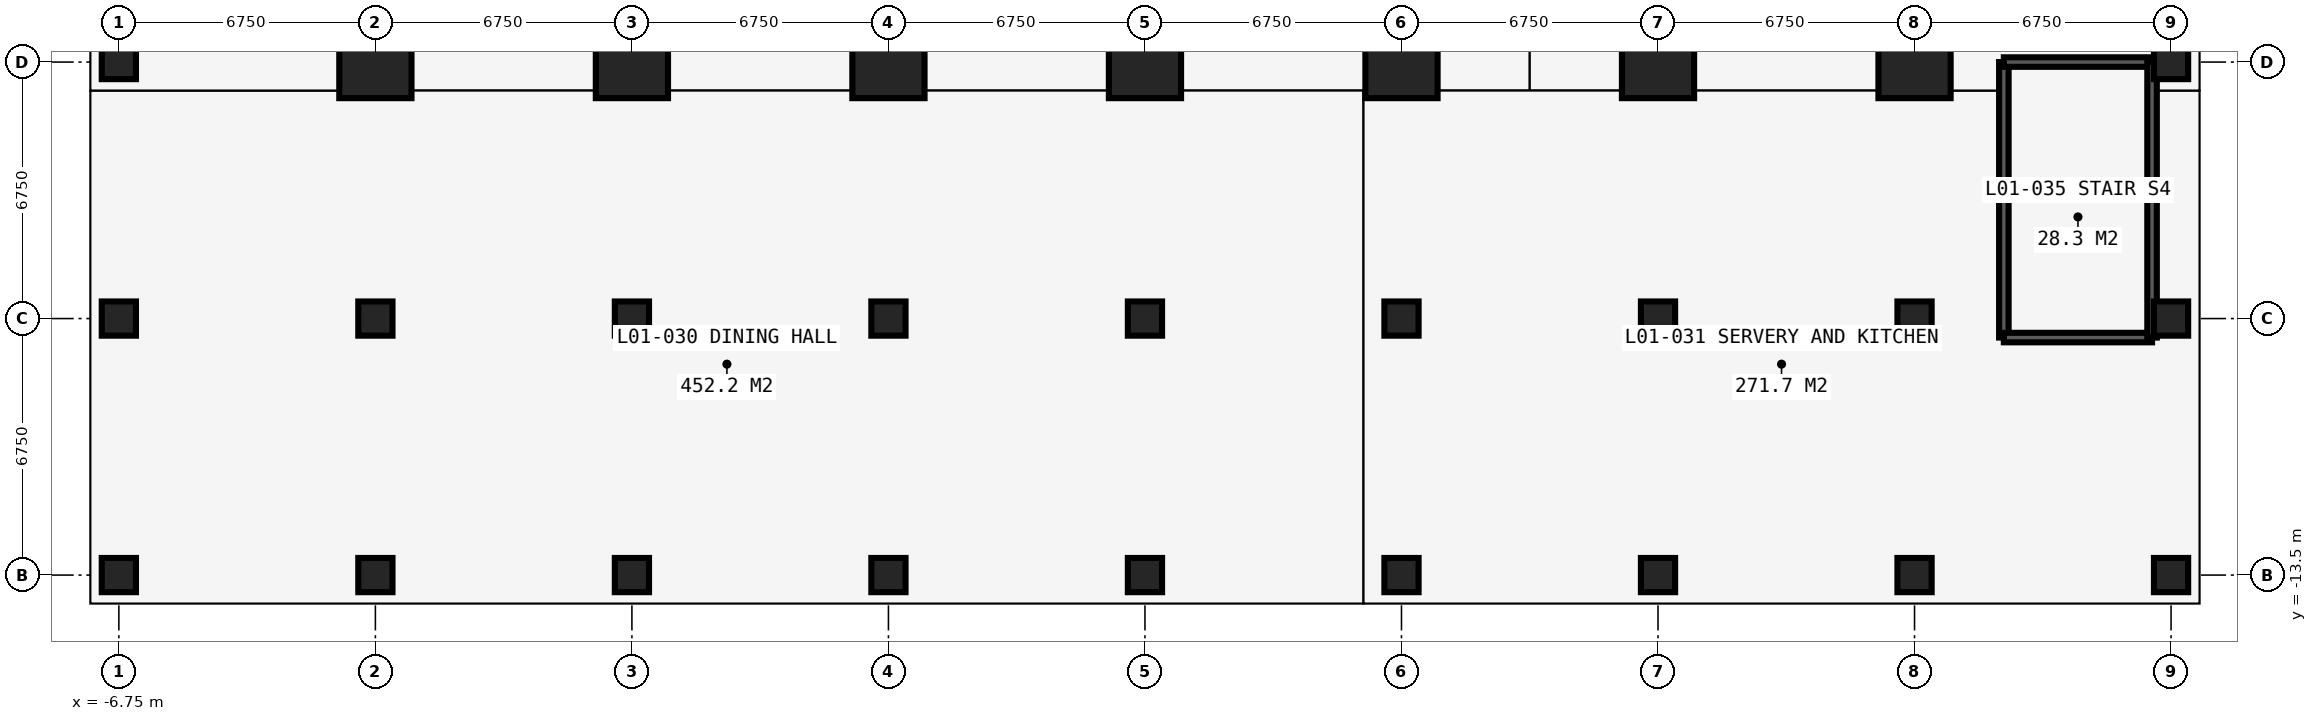
"""IFC4 building model, lengths in metres.
Left out: names, types, materials, properties, quantities, classifications, styles, units other than length and angle.
Written with IfcOpenShell. Run it as: python <this file> out.ifc"""

import sys

from ifc_helpers import new_model, si_unit, direction, frame, frame_2d, origin, origin_with_axes, origin_2d, place, context, subcontext, project, spatial, rectangle, circle, extrude, element, fill, save


model = new_model("IFC4")
c1 = context("Model", 3, precision=1e-05, world=origin(), true_north=direction((0.0, 1.0)))
c2 = subcontext(c1, "Body", "Model", "MODEL_VIEW")
j1 = project(units=[si_unit("LENGTHUNIT", "METRE"), si_unit("PLANEANGLEUNIT", "RADIAN")], contexts=[c1])
p1 = place(None, origin())
s1 = spatial("IfcSite", under=j1, at=p1, CompositionType="ELEMENT")
p2 = place(p1, origin())
s2 = spatial("IfcBuilding", under=s1, at=p2, CompositionType="ELEMENT")
p3 = place(p2, frame((0.0, 0.0, 4.5)))
s3 = spatial("IfcBuildingStorey", under=s2, at=p3, CompositionType="ELEMENT", Elevation=4.5)
for number, where, z_axis, x_axis in (
    (1, (-6.75, -13.5, 0.0), (0.0, 0.0, 1.0), (1.0, 0.0, 0.0)),
    (2, (-6.75, -6.75, 0.0), (0.0, 0.0, 1.0), (1.0, 0.0, 0.0)),
    (3, (-6.75, 0.0, 0.0), (0.0, 0.0, 1.0), (1.0, 0.0, 0.0)),
    (4, (0.0, -13.5, 0.0), (0.0, 0.0, 1.0), (1.0, 0.0, 0.0)),
    (5, (0.0, -6.75, 0.0), (0.0, 0.0, 1.0), (1.0, 0.0, 0.0)),
):
    element("IfcColumn", number, at=place(p3, frame(where, z_axis=z_axis, x_axis=x_axis)), inside=s3, PredefinedType="COLUMN", context=c2, shape_type="SweptSolid", body=[
        extrude(circle(Radius=0.45, at=origin_2d()), origin(), (0.0, 0.0, 1.0), 4.5),
    ])
p4 = place(p3, origin_with_axes())
e6 = element("IfcColumn", 6, at=p4, inside=s3, PredefinedType="COLUMN", context=c2, shape_type="SweptSolid", body=[
    extrude(rectangle(XDim=1.9, YDim=1.9, at=origin_2d()), origin(), (0.0, 0.0, 1.0), 4.5),
])
for number, where, z_axis, x_axis in (
    (7, (6.75, -13.5, 0.0), (0.0, 0.0, 1.0), (1.0, 0.0, 0.0)),
    (8, (6.75, -6.75, 0.0), (0.0, 0.0, 1.0), (1.0, 0.0, 0.0)),
):
    element("IfcColumn", number, at=place(p3, frame(where, z_axis=z_axis, x_axis=x_axis)), inside=s3, PredefinedType="COLUMN", context=c2, shape_type="SweptSolid", body=[
        extrude(circle(Radius=0.45, at=origin_2d()), origin(), (0.0, 0.0, 1.0), 4.5),
    ])
p5 = place(p3, frame((6.75, 0.0, 0.0), z_axis=(0.0, 0.0, 1.0), x_axis=(1.0, 0.0, 0.0)))
e9 = element("IfcColumn", 9, at=p5, inside=s3, PredefinedType="COLUMN", context=c2, shape_type="SweptSolid", body=[
    extrude(rectangle(XDim=1.9, YDim=1.9, at=origin_2d()), origin(), (0.0, 0.0, 1.0), 4.5),
])
for number, where, z_axis, x_axis in (
    (10, (13.5, -13.5, 0.0), (0.0, 0.0, 1.0), (1.0, 0.0, 0.0)),
    (11, (13.5, -6.75, 0.0), (0.0, 0.0, 1.0), (1.0, 0.0, 0.0)),
):
    element("IfcColumn", number, at=place(p3, frame(where, z_axis=z_axis, x_axis=x_axis)), inside=s3, PredefinedType="COLUMN", context=c2, shape_type="SweptSolid", body=[
        extrude(circle(Radius=0.45, at=origin_2d()), origin(), (0.0, 0.0, 1.0), 4.5),
    ])
p6 = place(p3, frame((13.5, 0.0, 0.0), z_axis=(0.0, 0.0, 1.0), x_axis=(1.0, 0.0, 0.0)))
e12 = element("IfcColumn", 12, at=p6, inside=s3, PredefinedType="COLUMN", context=c2, shape_type="SweptSolid", body=[
    extrude(rectangle(XDim=1.9, YDim=1.9, at=origin_2d()), origin(), (0.0, 0.0, 1.0), 4.5),
])
for number, where, z_axis, x_axis in (
    (13, (20.25, -13.5, 0.0), (0.0, 0.0, 1.0), (1.0, 0.0, 0.0)),
    (14, (20.25, -6.75, 0.0), (0.0, 0.0, 1.0), (1.0, 0.0, 0.0)),
):
    element("IfcColumn", number, at=place(p3, frame(where, z_axis=z_axis, x_axis=x_axis)), inside=s3, PredefinedType="COLUMN", context=c2, shape_type="SweptSolid", body=[
        extrude(circle(Radius=0.45, at=origin_2d()), origin(), (0.0, 0.0, 1.0), 4.5),
    ])
p7 = place(p3, frame((20.25, 0.0, 0.0), z_axis=(0.0, 0.0, 1.0), x_axis=(1.0, 0.0, 0.0)))
e15 = element("IfcColumn", 15, at=p7, inside=s3, PredefinedType="COLUMN", context=c2, shape_type="SweptSolid", body=[
    extrude(rectangle(XDim=1.9, YDim=1.9, at=origin_2d()), origin(), (0.0, 0.0, 1.0), 4.5),
])
for number, where, z_axis, x_axis in (
    (16, (27.0, -13.5, 0.0), (0.0, 0.0, 1.0), (1.0, 0.0, 0.0)),
    (17, (27.0, -6.75, 0.0), (0.0, 0.0, 1.0), (1.0, 0.0, 0.0)),
):
    element("IfcColumn", number, at=place(p3, frame(where, z_axis=z_axis, x_axis=x_axis)), inside=s3, PredefinedType="COLUMN", context=c2, shape_type="SweptSolid", body=[
        extrude(circle(Radius=0.45, at=origin_2d()), origin(), (0.0, 0.0, 1.0), 4.5),
    ])
p8 = place(p3, frame((27.0, 0.0, 0.0), z_axis=(0.0, 0.0, 1.0), x_axis=(1.0, 0.0, 0.0)))
e18 = element("IfcColumn", 18, at=p8, inside=s3, PredefinedType="COLUMN", context=c2, shape_type="SweptSolid", body=[
    extrude(rectangle(XDim=1.9, YDim=1.9, at=origin_2d()), origin(), (0.0, 0.0, 1.0), 4.5),
])
for number, where, z_axis, x_axis in (
    (19, (33.75, -13.5, 0.0), (0.0, 0.0, 1.0), (1.0, 0.0, 0.0)),
    (20, (33.75, -6.75, 0.0), (0.0, 0.0, 1.0), (1.0, 0.0, 0.0)),
):
    element("IfcColumn", number, at=place(p3, frame(where, z_axis=z_axis, x_axis=x_axis)), inside=s3, PredefinedType="COLUMN", context=c2, shape_type="SweptSolid", body=[
        extrude(circle(Radius=0.45, at=origin_2d()), origin(), (0.0, 0.0, 1.0), 4.5),
    ])
p9 = place(p3, frame((33.75, 0.0, 0.0), z_axis=(0.0, 0.0, 1.0), x_axis=(1.0, 0.0, 0.0)))
e21 = element("IfcColumn", 21, at=p9, inside=s3, PredefinedType="COLUMN", context=c2, shape_type="SweptSolid", body=[
    extrude(rectangle(XDim=1.9, YDim=1.9, at=origin_2d()), origin(), (0.0, 0.0, 1.0), 4.5),
])
for number, where, z_axis, x_axis in (
    (22, (40.5, -13.5, 0.0), (0.0, 0.0, 1.0), (1.0, 0.0, 0.0)),
    (23, (40.5, -6.75, 0.0), (0.0, 0.0, 1.0), (1.0, 0.0, 0.0)),
):
    element("IfcColumn", number, at=place(p3, frame(where, z_axis=z_axis, x_axis=x_axis)), inside=s3, PredefinedType="COLUMN", context=c2, shape_type="SweptSolid", body=[
        extrude(circle(Radius=0.45, at=origin_2d()), origin(), (0.0, 0.0, 1.0), 4.5),
    ])
p10 = place(p3, frame((40.5, 0.0, 0.0), z_axis=(0.0, 0.0, 1.0), x_axis=(1.0, 0.0, 0.0)))
e24 = element("IfcColumn", 24, at=p10, inside=s3, PredefinedType="COLUMN", context=c2, shape_type="SweptSolid", body=[
    extrude(rectangle(XDim=1.9, YDim=1.9, at=origin_2d()), origin(), (0.0, 0.0, 1.0), 4.5),
])
for number, where, z_axis, x_axis in (
    (25, (47.25, -13.5, 0.0), (0.0, 0.0, 1.0), (1.0, 0.0, 0.0)),
    (26, (47.25, -6.75, 0.0), (0.0, 0.0, 1.0), (1.0, 0.0, 0.0)),
    (27, (47.25, 0.0, 0.0), (0.0, 0.0, 1.0), (1.0, 0.0, 0.0)),
):
    element("IfcColumn", number, at=place(p3, frame(where, z_axis=z_axis, x_axis=x_axis)), inside=s3, PredefinedType="COLUMN", context=c2, shape_type="SweptSolid", body=[
        extrude(circle(Radius=0.45, at=origin_2d()), origin(), (0.0, 0.0, 1.0), 4.5),
    ])
p11 = place(p3, frame((13.5, -14.25, 0.0), z_axis=(0.0, 0.0, 1.0), x_axis=(-1.0, 0.0, 0.0)))
e28 = element("IfcWall", 28, at=p11, inside=s3, PredefinedType="SOLIDWALL", context=c2, shape_type="SweptSolid", body=[
    extrude(rectangle(XDim=6.75, YDim=0.15, at=frame_2d((3.375, 0.0))), origin(), (0.0, 0.0, 1.0), 4.25),
])
p12 = place(p11, frame((0.488, 0.0, 0.0)))
e29 = element("IfcOpeningElement", 29, at=p12, cuts=e28, PredefinedType="OPENING", context=c2, shape_type="SweptSolid", body=[
    extrude(rectangle(XDim=2.4, YDim=2.4, at=frame_2d((1.2, 1.2))), frame((0.0, 0.085, 0.0), z_axis=(0.0, -1.0, 0.0), x_axis=(1.0, 0.0, 0.0)), (0.0, 0.0, 1.0), 0.17),
])
p13 = place(p11, frame((3.863, 0.0, 0.0)))
e30 = element("IfcOpeningElement", 30, at=p13, cuts=e28, PredefinedType="OPENING", context=c2, shape_type="SweptSolid", body=[
    extrude(rectangle(XDim=2.4, YDim=2.4, at=frame_2d((1.2, 1.2))), frame((0.0, 0.085, 0.0), z_axis=(0.0, -1.0, 0.0), x_axis=(1.0, 0.0, 0.0)), (0.0, 0.0, 1.0), 0.17),
])
p14 = place(p3, frame((27.0, -14.25, 0.0), z_axis=(0.0, 0.0, 1.0), x_axis=(-1.0, 0.0, 0.0)))
e31 = element("IfcWall", 31, at=p14, inside=s3, PredefinedType="SOLIDWALL", context=c2, shape_type="SweptSolid", body=[
    extrude(rectangle(XDim=6.75, YDim=0.15, at=frame_2d((3.375, 0.0))), origin(), (0.0, 0.0, 1.0), 4.25),
])
p15 = place(p14, frame((0.488, 0.0, 0.0)))
e32 = element("IfcOpeningElement", 32, at=p15, cuts=e31, PredefinedType="OPENING", context=c2, shape_type="SweptSolid", body=[
    extrude(rectangle(XDim=2.4, YDim=2.4, at=frame_2d((1.2, 1.2))), frame((0.0, 0.085, 0.0), z_axis=(0.0, -1.0, 0.0), x_axis=(1.0, 0.0, 0.0)), (0.0, 0.0, 1.0), 0.17),
])
p16 = place(p14, frame((3.863, 0.0, 0.0)))
e33 = element("IfcOpeningElement", 33, at=p16, cuts=e31, PredefinedType="OPENING", context=c2, shape_type="SweptSolid", body=[
    extrude(rectangle(XDim=2.4, YDim=2.4, at=frame_2d((1.2, 1.2))), frame((0.0, 0.085, 0.0), z_axis=(0.0, -1.0, 0.0), x_axis=(1.0, 0.0, 0.0)), (0.0, 0.0, 1.0), 0.17),
])
p17 = place(p3, frame((40.5, -14.25, 0.0), z_axis=(0.0, 0.0, 1.0), x_axis=(-1.0, 0.0, 0.0)))
e34 = element("IfcWall", 34, at=p17, inside=s3, PredefinedType="SOLIDWALL", context=c2, shape_type="SweptSolid", body=[
    extrude(rectangle(XDim=6.75, YDim=0.15, at=frame_2d((3.375, 0.0))), origin(), (0.0, 0.0, 1.0), 4.25),
])
p18 = place(p17, frame((0.488, 0.0, 0.0)))
e35 = element("IfcOpeningElement", 35, at=p18, cuts=e34, PredefinedType="OPENING", context=c2, shape_type="SweptSolid", body=[
    extrude(rectangle(XDim=2.4, YDim=2.4, at=frame_2d((1.2, 1.2))), frame((0.0, 0.085, 0.0), z_axis=(0.0, -1.0, 0.0), x_axis=(1.0, 0.0, 0.0)), (0.0, 0.0, 1.0), 0.17),
])
p19 = place(p17, frame((3.863, 0.0, 0.0)))
e36 = element("IfcOpeningElement", 36, at=p19, cuts=e34, PredefinedType="OPENING", context=c2, shape_type="SweptSolid", body=[
    extrude(rectangle(XDim=2.4, YDim=2.4, at=frame_2d((1.2, 1.2))), frame((0.0, 0.085, 0.0), z_axis=(0.0, -1.0, 0.0), x_axis=(1.0, 0.0, 0.0)), (0.0, 0.0, 1.0), 0.17),
])
p20 = place(p3, frame((-7.484, -0.75, 0.0), z_axis=(0.0, 0.0, 1.0), x_axis=(1.0, 0.0, 0.0)))
e37 = element("IfcWall", 37, at=p20, inside=s3, PredefinedType="PARTITIONING", context=c2, shape_type="SweptSolid", body=[
    extrude(rectangle(XDim=50.334, YDim=0.15, at=frame_2d((25.167, 0.0))), origin(), (0.0, 0.0, 1.0), 4.25),
])
p21 = place(p20, frame((18.384, 0.0, 0.0)))
e38 = element("IfcOpeningElement", 38, at=p21, cuts=e37, PredefinedType="OPENING", context=c2, shape_type="SweptSolid", body=[
    extrude(rectangle(XDim=1.6, YDim=2.4, at=frame_2d((0.8, 1.2))), frame((0.0, 0.085, 0.0), z_axis=(0.0, -1.0, 0.0), x_axis=(1.0, 0.0, 0.0)), (0.0, 0.0, 1.0), 0.17),
])
p22 = place(p20, frame((35.484, 0.0, 0.0)))
e39 = element("IfcOpeningElement", 39, at=p22, cuts=e37, PredefinedType="OPENING", context=c2, shape_type="SweptSolid", body=[
    extrude(rectangle(XDim=1.6, YDim=2.4, at=frame_2d((0.8, 1.2))), frame((0.0, 0.085, 0.0), z_axis=(0.0, -1.0, 0.0), x_axis=(1.0, 0.0, 0.0)), (0.0, 0.0, 1.0), 0.17),
])
p23 = place(p3, frame((-0.75, -0.75, 0.0), z_axis=(0.0, 0.0, 1.0), x_axis=(0.0, 1.0, 0.0)))
e40 = element("IfcWall", 40, at=p23, inside=s3, PredefinedType="PARTITIONING", context=c2, shape_type="SweptSolid", body=[
    extrude(rectangle(XDim=41.984, YDim=0.15, at=frame_2d((20.992, 0.0))), origin(), (0.0, 0.0, 1.0), 4.25),
])
p24 = place(p23, frame((4.65, 0.0, 0.0)))
e41 = element("IfcOpeningElement", 41, at=p24, cuts=e40, PredefinedType="OPENING", context=c2, shape_type="SweptSolid", body=[
    extrude(rectangle(XDim=1.6, YDim=2.4, at=frame_2d((0.8, 1.2))), frame((0.0, 0.085, 0.0), z_axis=(0.0, -1.0, 0.0), x_axis=(1.0, 0.0, 0.0)), (0.0, 0.0, 1.0), 0.17),
])
p25 = place(p3, frame((26.0, -14.175, 0.0), z_axis=(0.0, 0.0, 1.0), x_axis=(0.0, 1.0, 0.0)))
e42 = element("IfcWall", 42, at=p25, inside=s3, PredefinedType="PARTITIONING", context=c2, shape_type="SweptSolid", body=[
    extrude(rectangle(XDim=13.425, YDim=0.15, at=frame_2d((6.712, 0.0))), origin(), (0.0, 0.0, 1.0), 4.25),
])
p26 = place(p3, frame((30.375, -0.75, 0.0), z_axis=(0.0, 0.0, 1.0), x_axis=(0.0, 1.0, 0.0)))
e43 = element("IfcWall", 43, at=p26, inside=s3, PredefinedType="PARTITIONING", context=c2, shape_type="SweptSolid", body=[
    extrude(rectangle(XDim=12.05, YDim=0.15, at=frame_2d((6.025, 0.0))), origin(), (0.0, 0.0, 1.0), 4.25),
])
p27 = place(p3, frame((41.25, -0.75, 0.0), z_axis=(0.0, 0.0, 1.0), x_axis=(0.0, 1.0, 0.0)))
e44 = element("IfcWall", 44, at=p27, inside=s3, PredefinedType="PARTITIONING", context=c2, shape_type="SweptSolid", body=[
    extrude(rectangle(XDim=41.984, YDim=0.15, at=frame_2d((20.992, 0.0))), origin(), (0.0, 0.0, 1.0), 4.25),
])
p28 = place(p27, frame((15.2, 0.0, 0.0)))
e45 = element("IfcOpeningElement", 45, at=p28, cuts=e44, PredefinedType="OPENING", context=c2, shape_type="SweptSolid", body=[
    extrude(rectangle(XDim=1.6, YDim=2.4, at=frame_2d((0.8, 1.2))), frame((0.0, 0.085, 0.0), z_axis=(0.0, -1.0, 0.0), x_axis=(1.0, 0.0, 0.0)), (0.0, 0.0, 1.0), 0.17),
])
p29 = place(p3, frame((42.85, -7.25, 0.0), z_axis=(0.0, 0.0, 1.0), x_axis=(0.0, 1.0, 0.0)))
e46 = element("IfcWall", 46, at=p29, inside=s3, PredefinedType="SOLIDWALL", context=c2, shape_type="SweptSolid", body=[
    extrude(rectangle(XDim=7.25, YDim=0.25, at=frame_2d((3.625, 0.0))), origin(), (0.0, 0.0, 1.0), 4.25),
])
p30 = place(p3, frame((42.85, -7.25, 0.0), z_axis=(0.0, 0.0, 1.0), x_axis=(1.0, 0.0, 0.0)))
e47 = element("IfcWall", 47, at=p30, inside=s3, PredefinedType="SOLIDWALL", context=c2, shape_type="SweptSolid", body=[
    extrude(rectangle(XDim=3.9, YDim=0.25, at=frame_2d((1.95, 0.0))), origin(), (0.0, 0.0, 1.0), 4.25),
])
p31 = place(p30, frame((1.35, 0.0, 0.0)))
e48 = element("IfcOpeningElement", 48, at=p31, cuts=e47, PredefinedType="OPENING", context=c2, shape_type="SweptSolid", body=[
    extrude(rectangle(XDim=1.2, YDim=2.2, at=frame_2d((0.6, 1.1))), frame((0.0, 0.135, 0.0), z_axis=(0.0, -1.0, 0.0), x_axis=(1.0, 0.0, 0.0)), (0.0, 0.0, 1.0), 0.27),
])
p32 = place(p3, frame((42.85, 0.0, 0.0), z_axis=(0.0, 0.0, 1.0), x_axis=(1.0, 0.0, 0.0)))
e49 = element("IfcWall", 49, at=p32, inside=s3, PredefinedType="SOLIDWALL", context=c2, shape_type="SweptSolid", body=[
    extrude(rectangle(XDim=3.9, YDim=0.25, at=frame_2d((1.95, 0.0))), origin(), (0.0, 0.0, 1.0), 4.25),
])
p33 = place(p3, frame((46.75, -7.25, 0.0), z_axis=(0.0, 0.0, 1.0), x_axis=(0.0, 1.0, 0.0)))
e50 = element("IfcWall", 50, at=p33, inside=s3, PredefinedType="SOLIDWALL", context=c2, shape_type="SweptSolid", body=[
    extrude(rectangle(XDim=7.25, YDim=0.25, at=frame_2d((3.625, 0.0))), origin(), (0.0, 0.0, 1.0), 4.25),
])
p34 = place(p3, frame((46.75, -0.75, 0.0), z_axis=(0.0, 0.0, 1.0), x_axis=(1.0, 0.0, 0.0)))
e51 = element("IfcWall", 51, at=p34, inside=s3, PredefinedType="PARTITIONING", context=c2, shape_type="SweptSolid", body=[
    extrude(rectangle(XDim=1.234, YDim=0.15, at=frame_2d((0.617, 0.0))), origin(), (0.0, 0.0, 1.0), 4.25),
])
p35 = place(p12, origin())
e52 = element("IfcDoor", 52, at=p35, inside=s3, OperationType="SLIDING_TO_LEFT", PredefinedType="DOOR", context=c2, shape_type="SweptSolid", body=[
    extrude(rectangle(XDim=2.4, YDim=2.4, at=frame_2d((1.2, 1.2))), frame((0.0, 0.025, 0.0), z_axis=(0.0, -1.0, 0.0), x_axis=(1.0, 0.0, 0.0)), (0.0, 0.0, 1.0), 0.05),
])
fill(e29, e52)
p36 = place(p13, origin())
e53 = element("IfcDoor", 53, at=p36, inside=s3, OperationType="SLIDING_TO_LEFT", PredefinedType="DOOR", context=c2, shape_type="SweptSolid", body=[
    extrude(rectangle(XDim=2.4, YDim=2.4, at=frame_2d((1.2, 1.2))), frame((0.0, 0.025, 0.0), z_axis=(0.0, -1.0, 0.0), x_axis=(1.0, 0.0, 0.0)), (0.0, 0.0, 1.0), 0.05),
])
fill(e30, e53)
p37 = place(p15, origin())
e54 = element("IfcDoor", 54, at=p37, inside=s3, OperationType="SLIDING_TO_LEFT", PredefinedType="DOOR", context=c2, shape_type="SweptSolid", body=[
    extrude(rectangle(XDim=2.4, YDim=2.4, at=frame_2d((1.2, 1.2))), frame((0.0, 0.025, 0.0), z_axis=(0.0, -1.0, 0.0), x_axis=(1.0, 0.0, 0.0)), (0.0, 0.0, 1.0), 0.05),
])
fill(e32, e54)
p38 = place(p16, origin())
e55 = element("IfcDoor", 55, at=p38, inside=s3, OperationType="SLIDING_TO_LEFT", PredefinedType="DOOR", context=c2, shape_type="SweptSolid", body=[
    extrude(rectangle(XDim=2.4, YDim=2.4, at=frame_2d((1.2, 1.2))), frame((0.0, 0.025, 0.0), z_axis=(0.0, -1.0, 0.0), x_axis=(1.0, 0.0, 0.0)), (0.0, 0.0, 1.0), 0.05),
])
fill(e33, e55)
p39 = place(p18, origin())
e56 = element("IfcDoor", 56, at=p39, inside=s3, OperationType="SLIDING_TO_LEFT", PredefinedType="DOOR", context=c2, shape_type="SweptSolid", body=[
    extrude(rectangle(XDim=2.4, YDim=2.4, at=frame_2d((1.2, 1.2))), frame((0.0, 0.025, 0.0), z_axis=(0.0, -1.0, 0.0), x_axis=(1.0, 0.0, 0.0)), (0.0, 0.0, 1.0), 0.05),
])
fill(e35, e56)
p40 = place(p19, origin())
e57 = element("IfcDoor", 57, at=p40, inside=s3, OperationType="SLIDING_TO_LEFT", PredefinedType="DOOR", context=c2, shape_type="SweptSolid", body=[
    extrude(rectangle(XDim=2.4, YDim=2.4, at=frame_2d((1.2, 1.2))), frame((0.0, 0.025, 0.0), z_axis=(0.0, -1.0, 0.0), x_axis=(1.0, 0.0, 0.0)), (0.0, 0.0, 1.0), 0.05),
])
fill(e36, e57)
p41 = place(p21, origin())
e58 = element("IfcDoor", 58, at=p41, inside=s3, OperationType="DOUBLE_DOOR_SINGLE_SWING", PredefinedType="DOOR", context=c2, shape_type="SweptSolid", body=[
    extrude(rectangle(XDim=1.6, YDim=2.4, at=frame_2d((0.8, 1.2))), frame((0.0, 0.025, 0.0), z_axis=(0.0, -1.0, 0.0), x_axis=(1.0, 0.0, 0.0)), (0.0, 0.0, 1.0), 0.05),
])
fill(e38, e58)
p42 = place(p22, origin())
e59 = element("IfcDoor", 59, at=p42, inside=s3, OperationType="DOUBLE_DOOR_SINGLE_SWING", PredefinedType="DOOR", context=c2, shape_type="SweptSolid", body=[
    extrude(rectangle(XDim=1.6, YDim=2.4, at=frame_2d((0.8, 1.2))), frame((0.0, 0.025, 0.0), z_axis=(0.0, -1.0, 0.0), x_axis=(1.0, 0.0, 0.0)), (0.0, 0.0, 1.0), 0.05),
])
fill(e39, e59)
p43 = place(p31, origin())
e60 = element("IfcDoor", 60, at=p43, inside=s3, OperationType="SINGLE_SWING_LEFT", PredefinedType="DOOR", context=c2, shape_type="SweptSolid", body=[
    extrude(rectangle(XDim=1.2, YDim=2.2, at=frame_2d((0.6, 1.1))), frame((0.0, 0.025, 0.0), z_axis=(0.0, -1.0, 0.0), x_axis=(1.0, 0.0, 0.0)), (0.0, 0.0, 1.0), 0.05),
])
fill(e48, e60)
save(model, sys.argv[1])
